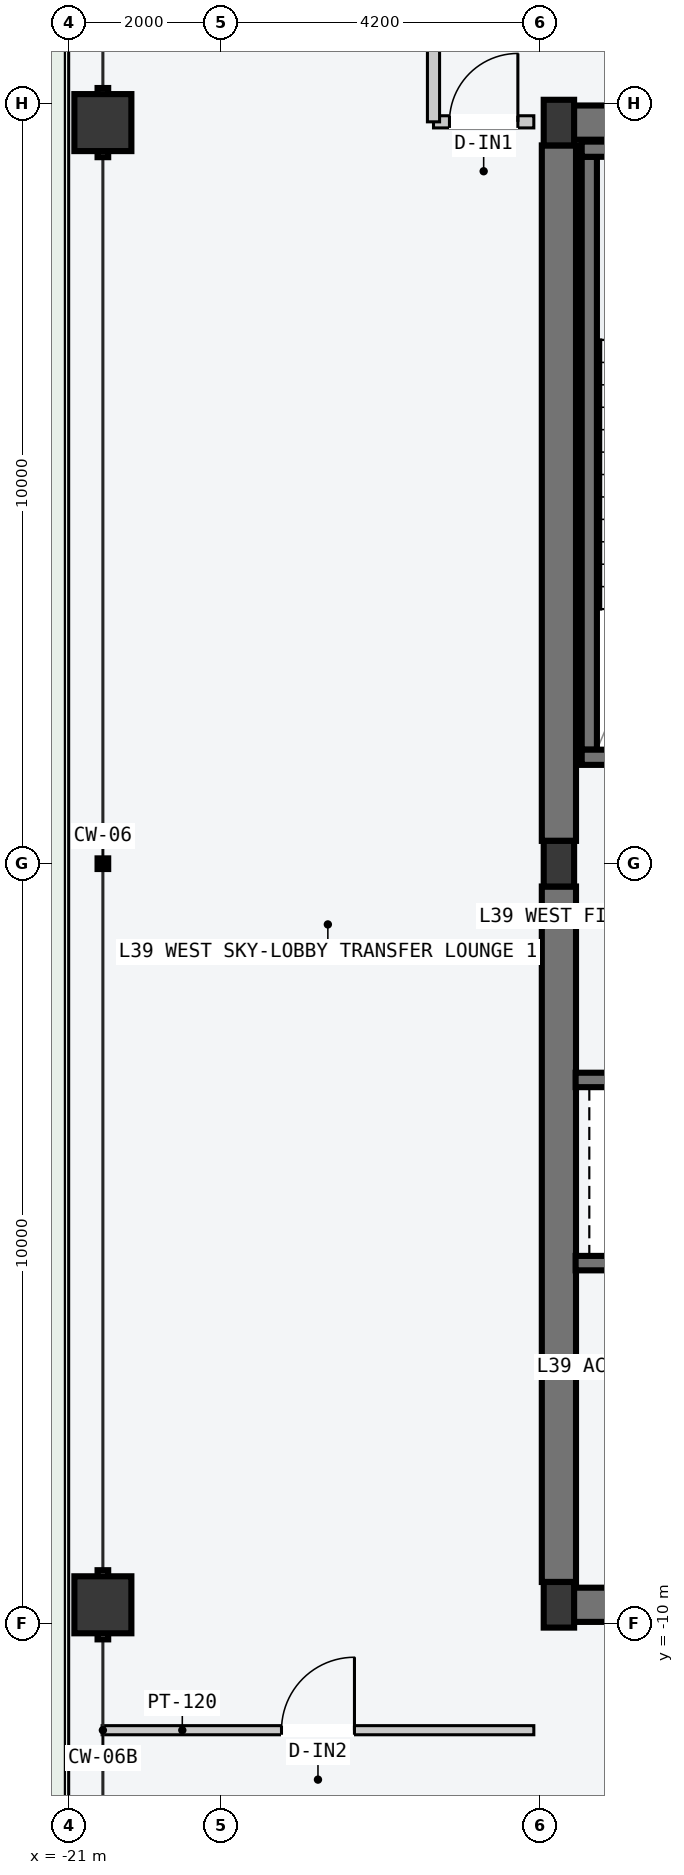
"""IFC4 building model, lengths in metres.
Left out: names, types, materials, properties, quantities, classifications, styles, units other than length and angle.
Written with IfcOpenShell. Run it as: python <this file> out.ifc"""

import sys

from ifc_helpers import new_model, si_unit, direction, frame, frame_2d, origin, origin_2d, place, context, subcontext, project, spatial, rectangle, hollow_rectangle, i_section, extrude, element, fill, save


model = new_model("IFC4")
c1 = context("Model", 3, precision=1e-05, world=origin(), true_north=direction((0.0, 1.0)))
c2 = subcontext(c1, "Body", "Model", "MODEL_VIEW")
j1 = project(units=[si_unit("LENGTHUNIT", "METRE"), si_unit("PLANEANGLEUNIT", "RADIAN")], contexts=[c1])
p1 = place(None, origin())
s1 = spatial("IfcSite", under=j1, at=p1, CompositionType="ELEMENT")
p2 = place(p1, origin())
s2 = spatial("IfcBuilding", under=s1, at=p2, CompositionType="ELEMENT")
p3 = place(p2, frame((0.0, 0.0, 150.6)))
s3 = spatial("IfcBuildingStorey", under=s2, at=p3, CompositionType="ELEMENT", Elevation=150.6)
for number, where, z_axis, x_axis in (
    (1, (-14.53, -9.75, -0.2), (0.0, 0.0, 1.0), (1.0, 0.0, 0.0)),
    (2, (-14.53, 9.75, -0.2), (0.0, 0.0, 1.0), (1.0, 0.0, 0.0)),
):
    element("IfcWall", number, at=place(p3, frame(where, z_axis=z_axis, x_axis=x_axis)), inside=s3, PredefinedType="SHEAR", context=c2, shape_type="SweptSolid", body=[
        extrude(rectangle(XDim=6.46, YDim=0.45, at=frame_2d((3.23, 0.0))), origin(), (0.0, 0.0, 1.0), 4.5),
    ])
for number, where, z_axis, x_axis in (
    (3, (-14.55, -9.45, -0.2), (0.0, 0.0, 1.0), (0.0, 1.0, 0.0)),
    (4, (-14.55, 0.3, -0.2), (0.0, 0.0, 1.0), (0.0, 1.0, 0.0)),
):
    element("IfcWall", number, at=place(p3, frame(where, z_axis=z_axis, x_axis=x_axis)), inside=s3, PredefinedType="SHEAR", context=c2, shape_type="SweptSolid", body=[
        extrude(rectangle(XDim=9.15, YDim=0.45, at=frame_2d((4.575, 0.0))), origin(), (0.0, 0.0, 1.0), 4.5),
    ])
p4 = place(p3, frame((-14.15, 1.5, -0.2), z_axis=(0.0, 0.0, 1.0), x_axis=(0.0, 1.0, 0.0)))
e5 = element("IfcWall", 5, at=p4, inside=s3, PredefinedType="SOLIDWALL", context=c2, shape_type="SweptSolid", body=[
    extrude(rectangle(XDim=7.8, YDim=0.2, at=frame_2d((3.9, 0.0))), origin(), (0.0, 0.0, 1.0), 4.5),
])
p5 = place(p3, frame((-14.25, 1.4, -0.2), z_axis=(0.0, 0.0, 1.0), x_axis=(1.0, 0.0, 0.0)))
e6 = element("IfcWall", 6, at=p5, inside=s3, PredefinedType="SOLIDWALL", context=c2, shape_type="SweptSolid", body=[
    extrude(rectangle(XDim=3.72, YDim=0.2, at=frame_2d((1.86, 0.0))), origin(), (0.0, 0.0, 1.0), 4.5),
])
p6 = place(p5, frame((1.5, 0.0, 0.2)))
e7 = element("IfcOpeningElement", 7, at=p6, cuts=e6, PredefinedType="OPENING", context=c2, shape_type="SweptSolid", body=[
    extrude(rectangle(XDim=1.12, YDim=2.18, at=frame_2d((0.56, 1.09))), frame((0.0, 0.11, 0.0), z_axis=(0.0, -1.0, 0.0), x_axis=(1.0, 0.0, 0.0)), (0.0, 0.0, 1.0), 0.22),
])
p7 = place(p3, frame((-14.25, 9.4, -0.2), z_axis=(0.0, 0.0, 1.0), x_axis=(1.0, 0.0, 0.0)))
e8 = element("IfcWall", 8, at=p7, inside=s3, PredefinedType="SOLIDWALL", context=c2, shape_type="SweptSolid", body=[
    extrude(rectangle(XDim=3.72, YDim=0.2, at=frame_2d((1.86, 0.0))), origin(), (0.0, 0.0, 1.0), 4.5),
])
for number, where, z_axis, x_axis in (
    (9, (-14.55, -9.75, 0.0), (0.0, 0.0, 1.0), (1.0, 0.0, 0.0)),
    (10, (-14.55, 0.0, 0.0), (0.0, 0.0, 1.0), (1.0, 0.0, 0.0)),
    (11, (-14.55, 9.75, 0.0), (0.0, 0.0, 1.0), (1.0, 0.0, 0.0)),
):
    element("IfcColumn", number, at=place(p3, frame(where, z_axis=z_axis, x_axis=x_axis)), inside=s3, PredefinedType="COLUMN", context=c2, shape_type="SweptSolid", body=[
        extrude(i_section(OverallWidth=0.4, OverallDepth=0.6, WebThickness=0.022, FlangeThickness=0.036, at=origin_2d()), origin(), (0.0, 0.0, 1.0), 4.5),
    ])
for number, where, z_axis, x_axis in (
    (12, (-20.55, -9.75, -0.2), (0.0, 0.0, 1.0), (0.0, 1.0, 0.0)),
    (13, (-20.55, 9.75, -0.2), (0.0, 0.0, 1.0), (0.0, 1.0, 0.0)),
):
    element("IfcColumn", number, at=place(p3, frame(where, z_axis=z_axis, x_axis=x_axis)), inside=s3, PredefinedType="COLUMN", context=c2, shape_type="SweptSolid", body=[
        extrude(hollow_rectangle(XDim=0.75, YDim=0.75, WallThickness=0.032, at=origin_2d()), origin(), (0.0, 0.0, 1.0), 4.7),
    ])
p8 = place(p3, frame((-14.33, -2.845, -0.2), z_axis=(0.0, 0.0, 1.0), x_axis=(1.0, 0.0, 0.0)))
e14 = element("IfcWall", 14, at=p8, inside=s3, PredefinedType="SOLIDWALL", context=c2, shape_type="SweptSolid", body=[
    extrude(rectangle(XDim=2.68, YDim=0.19, at=frame_2d((1.34, 0.0))), origin(), (0.0, 0.0, 1.0), 4.5),
])
p9 = place(p8, frame((0.83, 0.0, 0.2)))
e15 = element("IfcOpeningElement", 15, at=p9, cuts=e14, PredefinedType="OPENING", context=c2, shape_type="SweptSolid", body=[
    extrude(rectangle(XDim=1.2, YDim=2.2, at=frame_2d((0.6, 1.1))), frame((0.0, 0.105, 0.0), z_axis=(0.0, -1.0, 0.0), x_axis=(1.0, 0.0, 0.0)), (0.0, 0.0, 1.0), 0.21),
])
p10 = place(p3, frame((-14.33, -5.255, -0.2), z_axis=(0.0, 0.0, 1.0), x_axis=(1.0, 0.0, 0.0)))
e16 = element("IfcWall", 16, at=p10, inside=s3, PredefinedType="SOLIDWALL", context=c2, shape_type="SweptSolid", body=[
    extrude(rectangle(XDim=2.68, YDim=0.19, at=frame_2d((1.34, 0.0))), origin(), (0.0, 0.0, 1.0), 4.5),
])
p11 = place(p3, frame((-20.56, -11.4, 0.0), z_axis=(0.0, 0.0, 1.0), x_axis=(1.0, 0.0, 0.0)))
e17 = element("IfcWall", 17, at=p11, inside=s3, PredefinedType="PARTITIONING", context=c2, shape_type="SweptSolid", body=[
    extrude(rectangle(XDim=5.68, YDim=0.12, at=frame_2d((2.84, 0.0))), origin(), (0.0, 0.0, 1.0), 4.3),
])
p12 = place(p11, frame((2.36, 0.0, 0.0)))
e18 = element("IfcOpeningElement", 18, at=p12, cuts=e17, PredefinedType="OPENING", context=c2, shape_type="SweptSolid", body=[
    extrude(rectangle(XDim=0.96, YDim=2.18, at=frame_2d((0.48, 1.09))), frame((0.0, 0.07, 0.0), z_axis=(0.0, -1.0, 0.0), x_axis=(1.0, 0.0, 0.0)), (0.0, 0.0, 1.0), 0.14),
])
p13 = place(p3, frame((-16.2, 9.76, 0.0), z_axis=(0.0, 0.0, 1.0), x_axis=(1.0, 0.0, 0.0)))
e19 = element("IfcWall", 19, at=p13, inside=s3, PredefinedType="PARTITIONING", context=c2, shape_type="SweptSolid", body=[
    extrude(rectangle(XDim=1.32, YDim=0.16, at=frame_2d((0.66, 0.0))), origin(), (0.0, 0.0, 1.0), 3.6),
])
p14 = place(p13, frame((0.21, 0.0, 0.0)))
e20 = element("IfcOpeningElement", 20, at=p14, cuts=e19, PredefinedType="OPENING", context=c2, shape_type="SweptSolid", body=[
    extrude(rectangle(XDim=0.9, YDim=2.15, at=frame_2d((0.45, 1.075))), frame((0.0, 0.09, 0.0), z_axis=(0.0, -1.0, 0.0), x_axis=(1.0, 0.0, 0.0)), (0.0, 0.0, 1.0), 0.18),
])
p15 = place(p3, frame((-16.2, 9.76, 0.0), z_axis=(0.0, 0.0, 1.0), x_axis=(0.0, 1.0, 0.0)))
e21 = element("IfcWall", 21, at=p15, inside=s3, PredefinedType="PARTITIONING", context=c2, shape_type="SweptSolid", body=[
    extrude(rectangle(XDim=1.95, YDim=0.16, at=frame_2d((0.975, 0.0))), origin(), (0.0, 0.0, 1.0), 4.3),
])
p16 = place(p12, origin())
e22 = element("IfcDoor", 22, at=p16, inside=s3, OperationType="SINGLE_SWING_RIGHT", PredefinedType="DOOR", context=c2, shape_type="SweptSolid", body=[
    extrude(rectangle(XDim=0.96, YDim=2.18, at=frame_2d((0.48, 1.09))), frame((0.0, 0.025, 0.0), z_axis=(0.0, -1.0, 0.0), x_axis=(1.0, 0.0, 0.0)), (0.0, 0.0, 1.0), 0.05),
])
fill(e18, e22)
p17 = place(p14, origin())
e23 = element("IfcDoor", 23, at=p17, inside=s3, OperationType="SINGLE_SWING_RIGHT", PredefinedType="DOOR", context=c2, shape_type="SweptSolid", body=[
    extrude(rectangle(XDim=0.9, YDim=2.15, at=frame_2d((0.45, 1.075))), frame((0.0, 0.025, 0.0), z_axis=(0.0, -1.0, 0.0), x_axis=(1.0, 0.0, 0.0)), (0.0, 0.0, 1.0), 0.05),
])
fill(e20, e23)
save(model, sys.argv[1])
